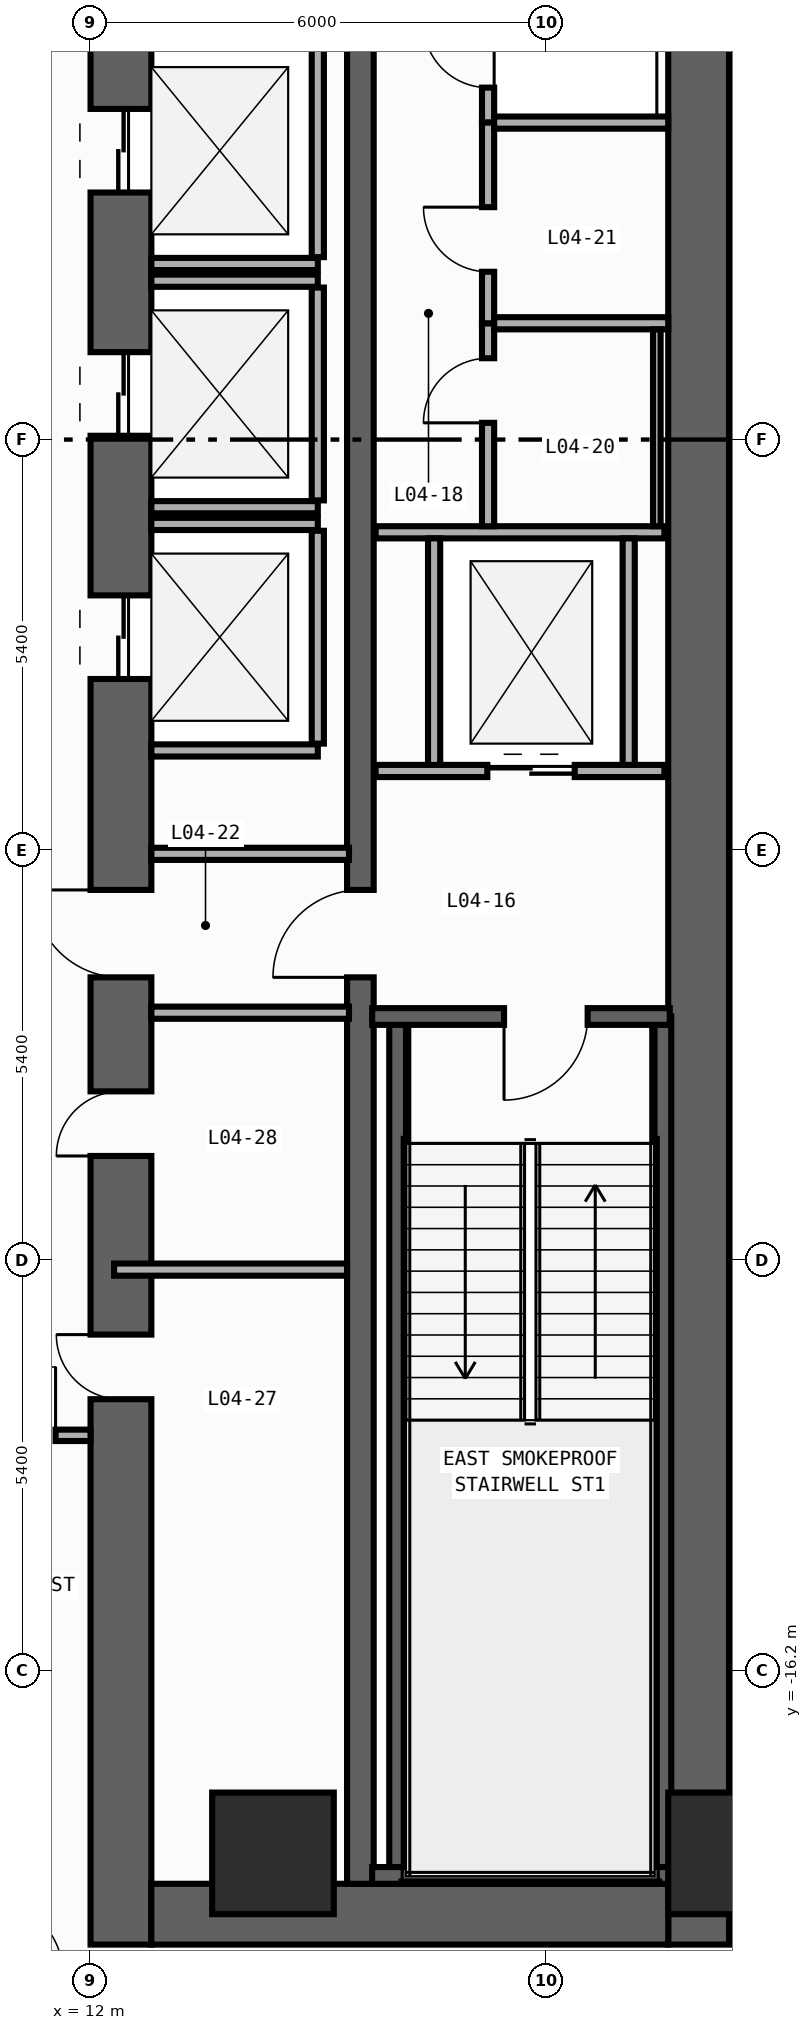
"""IFC4 building model, lengths in metres.
Left out: names, types, materials, properties, quantities, classifications, styles, units other than length and angle.
Written with IfcOpenShell. Run it as: python <this file> out.ifc"""

import sys

from ifc_helpers import new_model, si_unit, direction, frame, frame_2d, origin, origin_2d, place, context, subcontext, project, spatial, rectangle, extrude, element, fill, save


model = new_model("IFC4")
c1 = context("Model", 3, precision=1e-05, world=origin(), true_north=direction((0.0, 1.0)))
c2 = subcontext(c1, "Body", "Model", "MODEL_VIEW")
j1 = project(units=[si_unit("LENGTHUNIT", "METRE"), si_unit("PLANEANGLEUNIT", "RADIAN")], contexts=[c1])
p1 = place(None, origin())
s1 = spatial("IfcSite", under=j1, at=p1, CompositionType="ELEMENT")
p2 = place(p1, origin())
s2 = spatial("IfcBuilding", under=s1, at=p2, CompositionType="ELEMENT")
p3 = place(p2, frame((0.0, 0.0, 16.0)))
s3 = spatial("IfcBuildingStorey", under=s2, at=p3, CompositionType="ELEMENT", Elevation=16.0)
p4 = place(p3, frame((12.4, -19.8, 0.0), z_axis=(0.0, 0.0, 1.0), x_axis=(0.0, 1.0, 0.0)))
e1 = element("IfcWall", 1, at=p4, inside=s3, PredefinedType="SHEAR", context=c2, shape_type="SweptSolid", body=[
    extrude(rectangle(XDim=27.0, YDim=0.8, at=frame_2d((13.5, 0.0))), origin(), (0.0, 0.0, 1.0), 4.55),
])
p5 = place(p4, frame((23.05, 0.0, 0.0)))
e2 = element("IfcOpeningElement", 2, at=p5, cuts=e1, PredefinedType="OPENING", context=c2, shape_type="SweptSolid", body=[
    extrude(rectangle(XDim=1.1, YDim=2.2, at=frame_2d((0.55, 1.1))), frame((0.0, 0.41, 0.0), z_axis=(0.0, -1.0, 0.0), x_axis=(1.0, 0.0, 0.0)), (0.0, 0.0, 1.0), 0.82),
])
p6 = place(p4, frame((19.85, 0.0, 0.0)))
e3 = element("IfcOpeningElement", 3, at=p6, cuts=e1, PredefinedType="OPENING", context=c2, shape_type="SweptSolid", body=[
    extrude(rectangle(XDim=1.1, YDim=2.2, at=frame_2d((0.55, 1.1))), frame((0.0, 0.41, 0.0), z_axis=(0.0, -1.0, 0.0), x_axis=(1.0, 0.0, 0.0)), (0.0, 0.0, 1.0), 0.82),
])
p7 = place(p4, frame((16.65, 0.0, 0.0)))
e4 = element("IfcOpeningElement", 4, at=p7, cuts=e1, PredefinedType="OPENING", context=c2, shape_type="SweptSolid", body=[
    extrude(rectangle(XDim=1.1, YDim=2.2, at=frame_2d((0.55, 1.1))), frame((0.0, 0.41, 0.0), z_axis=(0.0, -1.0, 0.0), x_axis=(1.0, 0.0, 0.0)), (0.0, 0.0, 1.0), 0.82),
])
p8 = place(p4, frame((7.175, 0.0, 0.0)))
e5 = element("IfcOpeningElement", 5, at=p8, cuts=e1, PredefinedType="OPENING", context=c2, shape_type="SweptSolid", body=[
    extrude(rectangle(XDim=0.85, YDim=2.1, at=frame_2d((0.425, 1.05))), frame((0.0, 0.41, 0.0), z_axis=(0.0, -1.0, 0.0), x_axis=(1.0, 0.0, 0.0)), (0.0, 0.0, 1.0), 0.82),
])
p9 = place(p4, frame((10.375, 0.0, 0.0)))
e6 = element("IfcOpeningElement", 6, at=p9, cuts=e1, PredefinedType="OPENING", context=c2, shape_type="SweptSolid", body=[
    extrude(rectangle(XDim=0.85, YDim=2.1, at=frame_2d((0.425, 1.05))), frame((0.0, 0.41, 0.0), z_axis=(0.0, -1.0, 0.0), x_axis=(1.0, 0.0, 0.0)), (0.0, 0.0, 1.0), 0.82),
])
p10 = place(p4, frame((12.725, 0.0, 0.0)))
e7 = element("IfcOpeningElement", 7, at=p10, cuts=e1, PredefinedType="OPENING", context=c2, shape_type="SweptSolid", body=[
    extrude(rectangle(XDim=1.15, YDim=2.2, at=frame_2d((0.575, 1.1))), frame((0.0, 0.41, 0.0), z_axis=(0.0, -1.0, 0.0), x_axis=(1.0, 0.0, 0.0)), (0.0, 0.0, 1.0), 0.82),
])
p11 = place(p4, frame((25.125, 0.0, 0.0)))
e8 = element("IfcOpeningElement", 8, at=p11, cuts=e1, PredefinedType="OPENING", context=c2, shape_type="SweptSolid", body=[
    extrude(rectangle(XDim=0.85, YDim=2.1, at=frame_2d((0.425, 1.05))), frame((0.0, 0.41, 0.0), z_axis=(0.0, -1.0, 0.0), x_axis=(1.0, 0.0, 0.0)), (0.0, 0.0, 1.0), 0.82),
])
p12 = place(p3, frame((20.0, -19.8, 0.0), z_axis=(0.0, 0.0, 1.0), x_axis=(0.0, 1.0, 0.0)))
e9 = element("IfcWall", 9, at=p12, inside=s3, PredefinedType="SHEAR", context=c2, shape_type="SweptSolid", body=[
    extrude(rectangle(XDim=27.0, YDim=0.8, at=frame_2d((13.5, 0.0))), origin(), (0.0, 0.0, 1.0), 4.55),
])
p13 = place(p3, frame((12.8, -19.4, 0.0), z_axis=(0.0, 0.0, 1.0), x_axis=(1.0, 0.0, 0.0)))
e10 = element("IfcWall", 10, at=p13, inside=s3, PredefinedType="SHEAR", context=c2, shape_type="SweptSolid", body=[
    extrude(rectangle(XDim=6.8, YDim=0.8, at=frame_2d((3.4, 0.0))), origin(), (0.0, 0.0, 1.0), 4.55),
])
p14 = place(p3, frame((15.55, -19.0, 0.0), z_axis=(0.0, 0.0, 1.0), x_axis=(0.0, 1.0, 0.0)))
e11 = element("IfcWall", 11, at=p14, inside=s3, PredefinedType="SHEAR", context=c2, shape_type="SweptSolid", body=[
    extrude(rectangle(XDim=25.4, YDim=0.35, at=frame_2d((12.7, 0.0))), origin(), (0.0, 0.0, 1.0), 4.55),
])
p15 = place(p14, frame((11.925, 0.0, 0.0)))
e12 = element("IfcOpeningElement", 12, at=p15, cuts=e11, PredefinedType="OPENING", context=c2, shape_type="SweptSolid", body=[
    extrude(rectangle(XDim=1.15, YDim=2.2, at=frame_2d((0.575, 1.1))), frame((0.0, 0.185, 0.0), z_axis=(0.0, -1.0, 0.0), x_axis=(1.0, 0.0, 0.0)), (0.0, 0.0, 1.0), 0.37),
])
p16 = place(p14, frame((24.325, 0.0, 0.0)))
e13 = element("IfcOpeningElement", 13, at=p16, cuts=e11, PredefinedType="OPENING", context=c2, shape_type="SweptSolid", body=[
    extrude(rectangle(XDim=0.85, YDim=2.1, at=frame_2d((0.425, 1.05))), frame((0.0, 0.185, 0.0), z_axis=(0.0, -1.0, 0.0), x_axis=(1.0, 0.0, 0.0)), (0.0, 0.0, 1.0), 0.37),
])
for number, where, z_axis, x_axis in (
    (14, (16.04, -18.89, 0.0), (0.0, 0.0, 1.0), (0.0, 1.0, 0.0)),
    (15, (19.53, -18.89, 0.0), (0.0, 0.0, 1.0), (0.0, 1.0, 0.0)),
):
    element("IfcWall", number, at=place(p3, frame(where, z_axis=z_axis, x_axis=x_axis)), inside=s3, PredefinedType="SHEAR", context=c2, shape_type="SweptSolid", body=[
        extrude(rectangle(XDim=11.3, YDim=0.22, at=frame_2d((5.65, 0.0))), origin(), (0.0, 0.0, 1.0), 4.55),
    ])
p17 = place(p3, frame((15.705, -18.89, 0.0), z_axis=(0.0, 0.0, 1.0), x_axis=(1.0, 0.0, 0.0)))
e16 = element("IfcWall", 16, at=p17, inside=s3, PredefinedType="SHEAR", context=c2, shape_type="SweptSolid", body=[
    extrude(rectangle(XDim=3.915, YDim=0.22, at=frame_2d((1.958, 0.0))), origin(), (0.0, 0.0, 1.0), 4.55),
])
p18 = place(p3, frame((19.62, -7.59, 0.0), z_axis=(0.0, 0.0, 1.0), x_axis=(-1.0, 0.0, 0.0)))
e17 = element("IfcWall", 17, at=p18, inside=s3, PredefinedType="SHEAR", context=c2, shape_type="SweptSolid", body=[
    extrude(rectangle(XDim=3.915, YDim=0.22, at=frame_2d((1.958, 0.0))), origin(), (0.0, 0.0, 1.0), 4.55),
])
p19 = place(p18, frame((1.08, 0.0, 0.0)))
e18 = element("IfcOpeningElement", 18, at=p19, cuts=e17, PredefinedType="OPENING", context=c2, shape_type="SweptSolid", body=[
    extrude(rectangle(XDim=1.1, YDim=2.2, at=frame_2d((0.55, 1.1))), frame((0.0, 0.12, 0.0), z_axis=(0.0, -1.0, 0.0), x_axis=(1.0, 0.0, 0.0)), (0.0, 0.0, 1.0), 0.24),
])
for number, where, z_axis, x_axis in (
    (19, (20.4, -18.6, 0.0), (0.0, 0.0, 1.0), (1.0, 0.0, 0.0)),
    (20, (14.4, -18.6, 0.0), (0.0, 0.0, 1.0), (1.0, 0.0, 0.0)),
):
    element("IfcColumn", number, at=place(p3, frame(where, z_axis=z_axis, x_axis=x_axis)), inside=s3, PredefinedType="COLUMN", context=c2, shape_type="SweptSolid", body=[
        extrude(rectangle(XDim=1.6, YDim=1.6, at=origin_2d()), origin(), (0.0, 0.0, 1.0), 5.0),
    ])
p20 = place(p3, frame((12.8, 2.31, 0.0), z_axis=(0.0, 0.0, 1.0), x_axis=(1.0, 0.0, 0.0)))
e21 = element("IfcWall", 21, at=p20, inside=s3, PredefinedType="STANDARD", context=c2, shape_type="SweptSolid", body=[
    extrude(rectangle(XDim=2.19, YDim=0.16, at=frame_2d((1.095, 0.0))), origin(), (0.0, 0.0, 1.0), 4.55),
])
p21 = place(p3, frame((14.99, 2.4, 0.0), z_axis=(0.0, 0.0, 1.0), x_axis=(0.0, 1.0, 0.0)))
e22 = element("IfcWall", 22, at=p21, inside=s3, PredefinedType="STANDARD", context=c2, shape_type="SweptSolid", body=[
    extrude(rectangle(XDim=2.8, YDim=0.16, at=frame_2d((1.4, 0.0))), origin(), (0.0, 0.0, 1.0), 4.55),
])
for number, where, z_axis, x_axis in (
    (23, (12.8, -0.89, 0.0), (0.0, 0.0, 1.0), (1.0, 0.0, 0.0)),
    (24, (12.8, 2.09, 0.0), (0.0, 0.0, 1.0), (1.0, 0.0, 0.0)),
):
    element("IfcWall", number, at=place(p3, frame(where, z_axis=z_axis, x_axis=x_axis)), inside=s3, PredefinedType="STANDARD", context=c2, shape_type="SweptSolid", body=[
        extrude(rectangle(XDim=2.19, YDim=0.16, at=frame_2d((1.095, 0.0))), origin(), (0.0, 0.0, 1.0), 4.55),
    ])
p22 = place(p3, frame((14.99, -0.8, 0.0), z_axis=(0.0, 0.0, 1.0), x_axis=(0.0, 1.0, 0.0)))
e25 = element("IfcWall", 25, at=p22, inside=s3, PredefinedType="STANDARD", context=c2, shape_type="SweptSolid", body=[
    extrude(rectangle(XDim=2.8, YDim=0.16, at=frame_2d((1.4, 0.0))), origin(), (0.0, 0.0, 1.0), 4.55),
])
for number, where, z_axis, x_axis in (
    (26, (12.8, -4.09, 0.0), (0.0, 0.0, 1.0), (1.0, 0.0, 0.0)),
    (27, (12.8, -1.11, 0.0), (0.0, 0.0, 1.0), (1.0, 0.0, 0.0)),
):
    element("IfcWall", number, at=place(p3, frame(where, z_axis=z_axis, x_axis=x_axis)), inside=s3, PredefinedType="STANDARD", context=c2, shape_type="SweptSolid", body=[
        extrude(rectangle(XDim=2.19, YDim=0.16, at=frame_2d((1.095, 0.0))), origin(), (0.0, 0.0, 1.0), 4.55),
    ])
p23 = place(p3, frame((14.99, -4.0, 0.0), z_axis=(0.0, 0.0, 1.0), x_axis=(0.0, 1.0, 0.0)))
e28 = element("IfcWall", 28, at=p23, inside=s3, PredefinedType="STANDARD", context=c2, shape_type="SweptSolid", body=[
    extrude(rectangle(XDim=2.8, YDim=0.16, at=frame_2d((1.4, 0.0))), origin(), (0.0, 0.0, 1.0), 4.55),
])
p24 = place(p3, frame((15.75, -4.36, 0.0), z_axis=(0.0, 0.0, 1.0), x_axis=(1.0, 0.0, 0.0)))
e29 = element("IfcWall", 29, at=p24, inside=s3, PredefinedType="STANDARD", context=c2, shape_type="SweptSolid", body=[
    extrude(rectangle(XDim=3.8, YDim=0.16, at=frame_2d((1.9, 0.0))), origin(), (0.0, 0.0, 1.0), 4.55),
])
p25 = place(p24, frame((1.47, 0.0, 0.0)))
e30 = element("IfcOpeningElement", 30, at=p25, cuts=e29, PredefinedType="OPENING", context=c2, shape_type="SweptSolid", body=[
    extrude(rectangle(XDim=1.15, YDim=2.2, at=frame_2d((0.575, 1.1))), frame((0.0, 0.09, 0.0), z_axis=(0.0, -1.0, 0.0), x_axis=(1.0, 0.0, 0.0)), (0.0, 0.0, 1.0), 0.18),
])
p26 = place(p3, frame((15.75, -1.22, 0.0), z_axis=(0.0, 0.0, 1.0), x_axis=(1.0, 0.0, 0.0)))
e31 = element("IfcWall", 31, at=p26, inside=s3, PredefinedType="STANDARD", context=c2, shape_type="SweptSolid", body=[
    extrude(rectangle(XDim=3.8, YDim=0.16, at=frame_2d((1.9, 0.0))), origin(), (0.0, 0.0, 1.0), 4.55),
])
for number, where, z_axis, x_axis in (
    (32, (16.52, -4.28, 0.0), (0.0, 0.0, 1.0), (0.0, 1.0, 0.0)),
    (33, (19.08, -4.28, 0.0), (0.0, 0.0, 1.0), (0.0, 1.0, 0.0)),
):
    element("IfcWall", number, at=place(p3, frame(where, z_axis=z_axis, x_axis=x_axis)), inside=s3, PredefinedType="STANDARD", context=c2, shape_type="SweptSolid", body=[
        extrude(rectangle(XDim=2.98, YDim=0.16, at=frame_2d((1.49, 0.0))), origin(), (0.0, 0.0, 1.0), 4.55),
    ])
for number, where, z_axis, x_axis in (
    (34, (12.8, -5.45, 0.0), (0.0, 0.0, 1.0), (1.0, 0.0, 0.0)),
    (35, (12.8, -7.54, 0.0), (0.0, 0.0, 1.0), (1.0, 0.0, 0.0)),
):
    element("IfcWall", number, at=place(p3, frame(where, z_axis=z_axis, x_axis=x_axis)), inside=s3, PredefinedType="STANDARD", context=c2, shape_type="SweptSolid", body=[
        extrude(rectangle(XDim=2.6, YDim=0.16, at=frame_2d((1.3, 0.0))), origin(), (0.0, 0.0, 1.0), 4.55),
    ])
p27 = place(p3, frame((17.23, 4.17, 0.0), z_axis=(0.0, 0.0, 1.0), x_axis=(0.0, 1.0, 0.0)))
e36 = element("IfcWall", 36, at=p27, inside=s3, PredefinedType="PARTITIONING", context=c2, shape_type="SweptSolid", body=[
    extrude(rectangle(XDim=2.23, YDim=0.16, at=frame_2d((1.115, 0.0))), origin(), (0.0, 0.0, 1.0), 4.55),
])
p28 = place(p27, frame((0.46, 0.0, 0.0)))
e37 = element("IfcOpeningElement", 37, at=p28, cuts=e36, PredefinedType="OPENING", context=c2, shape_type="SweptSolid", body=[
    extrude(rectangle(XDim=0.85, YDim=2.1, at=frame_2d((0.425, 1.05))), frame((0.0, 0.09, 0.0), z_axis=(0.0, -1.0, 0.0), x_axis=(1.0, 0.0, 0.0)), (0.0, 0.0, 1.0), 0.18),
])
p29 = place(p3, frame((17.23, -1.14, 0.0), z_axis=(0.0, 0.0, 1.0), x_axis=(0.0, 1.0, 0.0)))
e38 = element("IfcWall", 38, at=p29, inside=s3, PredefinedType="PARTITIONING", context=c2, shape_type="SweptSolid", body=[
    extrude(rectangle(XDim=2.67, YDim=0.16, at=frame_2d((1.335, 0.0))), origin(), (0.0, 0.0, 1.0), 4.55),
])
p30 = place(p29, frame((1.36, 0.0, 0.0)))
e39 = element("IfcOpeningElement", 39, at=p30, cuts=e38, PredefinedType="OPENING", context=c2, shape_type="SweptSolid", body=[
    extrude(rectangle(XDim=0.85, YDim=2.1, at=frame_2d((0.425, 1.05))), frame((0.0, 0.09, 0.0), z_axis=(0.0, -1.0, 0.0), x_axis=(1.0, 0.0, 0.0)), (0.0, 0.0, 1.0), 0.18),
])
p31 = place(p3, frame((17.23, 1.53, 0.0), z_axis=(0.0, 0.0, 1.0), x_axis=(0.0, 1.0, 0.0)))
e40 = element("IfcWall", 40, at=p31, inside=s3, PredefinedType="PARTITIONING", context=c2, shape_type="SweptSolid", body=[
    extrude(rectangle(XDim=2.64, YDim=0.16, at=frame_2d((1.32, 0.0))), origin(), (0.0, 0.0, 1.0), 4.55),
])
p32 = place(p31, frame((0.677, 0.0, 0.0)))
e41 = element("IfcOpeningElement", 41, at=p32, cuts=e40, PredefinedType="OPENING", context=c2, shape_type="SweptSolid", body=[
    extrude(rectangle(XDim=0.85, YDim=2.1, at=frame_2d((0.425, 1.05))), frame((0.0, 0.09, 0.0), z_axis=(0.0, -1.0, 0.0), x_axis=(1.0, 0.0, 0.0)), (0.0, 0.0, 1.0), 0.18),
])
for number, where, z_axis, x_axis in (
    (42, (17.31, 4.17, 0.0), (0.0, 0.0, 1.0), (1.0, 0.0, 0.0)),
    (43, (17.31, 1.53, 0.0), (0.0, 0.0, 1.0), (1.0, 0.0, 0.0)),
):
    element("IfcWall", number, at=place(p3, frame(where, z_axis=z_axis, x_axis=x_axis)), inside=s3, PredefinedType="PARTITIONING", context=c2, shape_type="SweptSolid", body=[
        extrude(rectangle(XDim=2.29, YDim=0.16, at=frame_2d((1.145, 0.0))), origin(), (0.0, 0.0, 1.0), 4.55),
    ])
p33 = place(p3, frame((12.31, -10.92, 0.0), z_axis=(0.0, 0.0, 1.0), x_axis=(1.0, 0.0, 0.0)))
e44 = element("IfcWall", 44, at=p33, inside=s3, PredefinedType="PARTITIONING", context=c2, shape_type="SweptSolid", body=[
    extrude(rectangle(XDim=3.065, YDim=0.16, at=frame_2d((1.532, 0.0))), origin(), (0.0, 0.0, 1.0), 3.65),
])
p34 = place(p3, frame((8.205, -13.1, 0.0), z_axis=(0.0, 0.0, 1.0), x_axis=(1.0, 0.0, 0.0)))
e45 = element("IfcWall", 45, at=p34, inside=s3, PredefinedType="PARTITIONING", context=c2, shape_type="SweptSolid", body=[
    extrude(rectangle(XDim=3.795, YDim=0.15, at=frame_2d((1.897, 0.0))), origin(), (0.0, 0.0, 1.0), 4.55),
])
p35 = place(p34, frame((2.435, 0.0, 0.0)))
e46 = element("IfcOpeningElement", 46, at=p35, cuts=e45, PredefinedType="OPENING", context=c2, shape_type="SweptSolid", body=[
    extrude(rectangle(XDim=0.9, YDim=2.15, at=frame_2d((0.45, 1.075))), frame((0.0, 0.085, 0.0), z_axis=(0.0, -1.0, 0.0), x_axis=(1.0, 0.0, 0.0)), (0.0, 0.0, 1.0), 0.17),
])
p36 = place(p3, frame((20.4, -16.12, 0.0), z_axis=(0.0, 0.0, 1.0), x_axis=(1.0, 0.0, 0.0)))
e47 = element("IfcWall", 47, at=p36, inside=s3, PredefinedType="PARTITIONING", context=c2, shape_type="SweptSolid", body=[
    extrude(rectangle(XDim=4.045, YDim=0.14, at=frame_2d((2.022, 0.0))), origin(), (0.0, 0.0, 1.0), 4.55),
])
p37 = place(p3, frame((19.45, 1.45, 0.0), z_axis=(0.0, 0.0, 1.0), x_axis=(0.0, -1.0, 0.0)))
e48 = element("IfcWall", 48, at=p37, inside=s3, PredefinedType="PARTITIONING", context=c2, shape_type="SweptSolid", body=[
    extrude(rectangle(XDim=2.59, YDim=0.1, at=frame_2d((1.295, 0.0))), origin(), (0.0, 0.0, 1.0), 4.55),
])
p38 = place(p19, origin())
e49 = element("IfcDoor", 49, at=p38, inside=s3, OperationType="SINGLE_SWING_RIGHT", PredefinedType="DOOR", context=c2, shape_type="SweptSolid", body=[
    extrude(rectangle(XDim=1.1, YDim=2.2, at=frame_2d((0.55, 1.1))), frame((0.0, 0.025, 0.0), z_axis=(0.0, -1.0, 0.0), x_axis=(1.0, 0.0, 0.0)), (0.0, 0.0, 1.0), 0.05),
])
fill(e18, e49)
p39 = place(p5, origin())
e50 = element("IfcDoor", 50, at=p39, inside=s3, OperationType="DOUBLE_DOOR_SLIDING", PredefinedType="DOOR", context=c2, shape_type="SweptSolid", body=[
    extrude(rectangle(XDim=1.1, YDim=2.2, at=frame_2d((0.55, 1.1))), frame((0.0, 0.025, 0.0), z_axis=(0.0, -1.0, 0.0), x_axis=(1.0, 0.0, 0.0)), (0.0, 0.0, 1.0), 0.05),
])
fill(e2, e50)
p40 = place(p6, origin())
e51 = element("IfcDoor", 51, at=p40, inside=s3, OperationType="DOUBLE_DOOR_SLIDING", PredefinedType="DOOR", context=c2, shape_type="SweptSolid", body=[
    extrude(rectangle(XDim=1.1, YDim=2.2, at=frame_2d((0.55, 1.1))), frame((0.0, 0.025, 0.0), z_axis=(0.0, -1.0, 0.0), x_axis=(1.0, 0.0, 0.0)), (0.0, 0.0, 1.0), 0.05),
])
fill(e3, e51)
p41 = place(p7, origin())
e52 = element("IfcDoor", 52, at=p41, inside=s3, OperationType="DOUBLE_DOOR_SLIDING", PredefinedType="DOOR", context=c2, shape_type="SweptSolid", body=[
    extrude(rectangle(XDim=1.1, YDim=2.2, at=frame_2d((0.55, 1.1))), frame((0.0, 0.025, 0.0), z_axis=(0.0, -1.0, 0.0), x_axis=(1.0, 0.0, 0.0)), (0.0, 0.0, 1.0), 0.05),
])
fill(e4, e52)
p42 = place(p8, origin())
e53 = element("IfcDoor", 53, at=p42, inside=s3, OperationType="SINGLE_SWING_RIGHT", PredefinedType="DOOR", context=c2, shape_type="SweptSolid", body=[
    extrude(rectangle(XDim=0.85, YDim=2.1, at=frame_2d((0.425, 1.05))), frame((0.0, 0.025, 0.0), z_axis=(0.0, -1.0, 0.0), x_axis=(1.0, 0.0, 0.0)), (0.0, 0.0, 1.0), 0.05),
])
fill(e5, e53)
p43 = place(p9, origin())
e54 = element("IfcDoor", 54, at=p43, inside=s3, OperationType="SINGLE_SWING_LEFT", PredefinedType="DOOR", context=c2, shape_type="SweptSolid", body=[
    extrude(rectangle(XDim=0.85, YDim=2.1, at=frame_2d((0.425, 1.05))), frame((0.0, 0.025, 0.0), z_axis=(0.0, -1.0, 0.0), x_axis=(1.0, 0.0, 0.0)), (0.0, 0.0, 1.0), 0.05),
])
fill(e6, e54)
p44 = place(p10, origin())
e55 = element("IfcDoor", 55, at=p44, inside=s3, OperationType="SINGLE_SWING_RIGHT", PredefinedType="DOOR", context=c2, shape_type="SweptSolid", body=[
    extrude(rectangle(XDim=1.15, YDim=2.2, at=frame_2d((0.575, 1.1))), frame((0.0, 0.025, 0.0), z_axis=(0.0, -1.0, 0.0), x_axis=(1.0, 0.0, 0.0)), (0.0, 0.0, 1.0), 0.05),
])
fill(e7, e55)
p45 = place(p15, origin())
e56 = element("IfcDoor", 56, at=p45, inside=s3, OperationType="SINGLE_SWING_LEFT", PredefinedType="DOOR", context=c2, shape_type="SweptSolid", body=[
    extrude(rectangle(XDim=1.15, YDim=2.2, at=frame_2d((0.575, 1.1))), frame((0.0, 0.025, 0.0), z_axis=(0.0, -1.0, 0.0), x_axis=(1.0, 0.0, 0.0)), (0.0, 0.0, 1.0), 0.05),
])
fill(e12, e56)
p46 = place(p25, origin())
e57 = element("IfcDoor", 57, at=p46, inside=s3, OperationType="DOUBLE_DOOR_SLIDING", PredefinedType="DOOR", context=c2, shape_type="SweptSolid", body=[
    extrude(rectangle(XDim=1.15, YDim=2.2, at=frame_2d((0.575, 1.1))), frame((0.0, 0.025, 0.0), z_axis=(0.0, -1.0, 0.0), x_axis=(1.0, 0.0, 0.0)), (0.0, 0.0, 1.0), 0.05),
])
fill(e30, e57)
p47 = place(p28, origin())
e58 = element("IfcDoor", 58, at=p47, inside=s3, OperationType="SINGLE_SWING_RIGHT", PredefinedType="DOOR", context=c2, shape_type="SweptSolid", body=[
    extrude(rectangle(XDim=0.85, YDim=2.1, at=frame_2d((0.425, 1.05))), frame((0.0, 0.025, 0.0), z_axis=(0.0, -1.0, 0.0), x_axis=(1.0, 0.0, 0.0)), (0.0, 0.0, 1.0), 0.05),
])
fill(e37, e58)
p48 = place(p30, origin())
e59 = element("IfcDoor", 59, at=p48, inside=s3, OperationType="SINGLE_SWING_LEFT", PredefinedType="DOOR", context=c2, shape_type="SweptSolid", body=[
    extrude(rectangle(XDim=0.85, YDim=2.1, at=frame_2d((0.425, 1.05))), frame((0.0, 0.025, 0.0), z_axis=(0.0, -1.0, 0.0), x_axis=(1.0, 0.0, 0.0)), (0.0, 0.0, 1.0), 0.05),
])
fill(e39, e59)
p49 = place(p32, origin())
e60 = element("IfcDoor", 60, at=p49, inside=s3, OperationType="SINGLE_SWING_RIGHT", PredefinedType="DOOR", context=c2, shape_type="SweptSolid", body=[
    extrude(rectangle(XDim=0.85, YDim=2.1, at=frame_2d((0.425, 1.05))), frame((0.0, 0.025, 0.0), z_axis=(0.0, -1.0, 0.0), x_axis=(1.0, 0.0, 0.0)), (0.0, 0.0, 1.0), 0.05),
])
fill(e41, e60)
p50 = place(p35, origin())
e61 = element("IfcDoor", 61, at=p50, inside=s3, OperationType="SINGLE_SWING_RIGHT", PredefinedType="DOOR", context=c2, shape_type="SweptSolid", body=[
    extrude(rectangle(XDim=0.9, YDim=2.15, at=frame_2d((0.45, 1.075))), frame((0.0, 0.025, 0.0), z_axis=(0.0, -1.0, 0.0), x_axis=(1.0, 0.0, 0.0)), (0.0, 0.0, 1.0), 0.05),
])
fill(e46, e61)
save(model, sys.argv[1])
